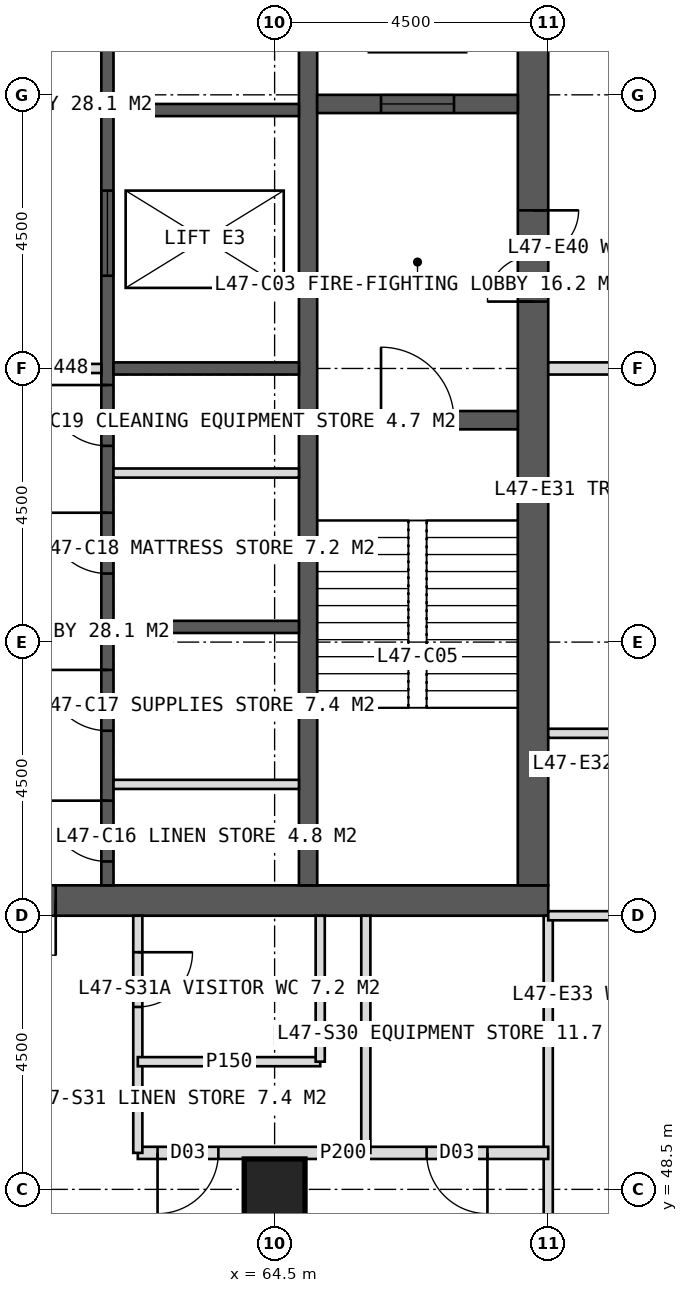
"""IFC4 building model, lengths in metres.
Left out: names, types, materials, properties, quantities, classifications, styles, units other than length and angle.
Written with IfcOpenShell. Run it as: python <this file> out.ifc"""

import sys

from ifc_helpers import new_model, si_unit, direction, frame, frame_2d, origin, origin_2d, place, context, subcontext, project, spatial, rectangle, hollow_rectangle, extrude, element, fill, save


model = new_model("IFC4")
c1 = context("Model", 3, precision=1e-05, world=origin(), true_north=direction((0.0, 1.0)))
c2 = subcontext(c1, "Body", "Model", "MODEL_VIEW")
j1 = project(units=[si_unit("LENGTHUNIT", "METRE"), si_unit("PLANEANGLEUNIT", "RADIAN")], contexts=[c1])
p1 = place(None, origin())
s1 = spatial("IfcSite", under=j1, at=p1, CompositionType="ELEMENT")
p2 = place(p1, origin())
s2 = spatial("IfcBuilding", under=s1, at=p2, CompositionType="ELEMENT")
p3 = place(p2, frame((0.0, 0.0, 197.0)))
s3 = spatial("IfcBuildingStorey", under=s2, at=p3, CompositionType="ELEMENT", Elevation=197.0)
p4 = place(p3, frame((51.0, 53.25, 0.0), z_axis=(0.0, 0.0, 1.0), x_axis=(1.0, 0.0, 0.0)))
e1 = element("IfcWall", 1, at=p4, inside=s3, PredefinedType="SHEAR", context=c2, shape_type="SweptSolid", body=[
    extrude(rectangle(XDim=18.0, YDim=0.5, at=frame_2d((9.0, 0.0))), origin(), (0.0, 0.0, 1.0), 4.0),
])
p5 = place(p4, frame((8.1, 0.0, 0.0)))
e2 = element("IfcOpeningElement", 2, at=p5, cuts=e1, PredefinedType="OPENING", context=c2, shape_type="SweptSolid", body=[
    extrude(rectangle(XDim=1.8, YDim=2.2, at=frame_2d((0.9, 1.1))), frame((0.0, 0.26, 0.0), z_axis=(0.0, -1.0, 0.0), x_axis=(1.0, 0.0, 0.0)), (0.0, 0.0, 1.0), 0.52),
])
p6 = place(p3, frame((68.75, 53.5, 0.0), z_axis=(0.0, 0.0, 1.0), x_axis=(0.0, 1.0, 0.0)))
e3 = element("IfcWall", 3, at=p6, inside=s3, PredefinedType="SHEAR", context=c2, shape_type="SweptSolid", body=[
    extrude(rectangle(XDim=17.0, YDim=0.5, at=frame_2d((8.5, 0.0))), origin(), (0.0, 0.0, 1.0), 4.0),
])
p7 = place(p6, frame((9.6, 0.0, 0.0)))
e4 = element("IfcOpeningElement", 4, at=p7, cuts=e3, PredefinedType="OPENING", context=c2, shape_type="SweptSolid", body=[
    extrude(rectangle(XDim=1.5, YDim=2.2, at=frame_2d((0.75, 1.1))), frame((0.0, 0.26, 0.0), z_axis=(0.0, -1.0, 0.0), x_axis=(1.0, 0.0, 0.0)), (0.0, 0.0, 1.0), 0.52),
])
p8 = place(p3, frame((65.05, 53.5, 0.0), z_axis=(0.0, 0.0, 1.0), x_axis=(0.0, 1.0, 0.0)))
e5 = element("IfcWall", 5, at=p8, inside=s3, PredefinedType="SHEAR", context=c2, shape_type="SweptSolid", body=[
    extrude(rectangle(XDim=17.0, YDim=0.3, at=frame_2d((8.5, 0.0))), origin(), (0.0, 0.0, 1.0), 4.0),
])
p9 = place(p3, frame((61.75, 53.5, 0.0), z_axis=(0.0, 0.0, 1.0), x_axis=(0.0, 1.0, 0.0)))
e6 = element("IfcWall", 6, at=p9, inside=s3, PredefinedType="SHEAR", context=c2, shape_type="SweptSolid", body=[
    extrude(rectangle(XDim=17.0, YDim=0.2, at=frame_2d((8.5, 0.0))), origin(), (0.0, 0.0, 1.0), 4.0),
])
p10 = place(p9, frame((0.393, 0.0, 0.0)))
e7 = element("IfcOpeningElement", 7, at=p10, cuts=e6, PredefinedType="OPENING", context=c2, shape_type="SweptSolid", body=[
    extrude(rectangle(XDim=1.0, YDim=2.1, at=frame_2d((0.5, 1.05))), frame((0.0, 0.11, 0.0), z_axis=(0.0, -1.0, 0.0), x_axis=(1.0, 0.0, 0.0)), (0.0, 0.0, 1.0), 0.22),
])
p11 = place(p9, frame((2.542, 0.0, 0.0)))
e8 = element("IfcOpeningElement", 8, at=p11, cuts=e6, PredefinedType="OPENING", context=c2, shape_type="SweptSolid", body=[
    extrude(rectangle(XDim=1.0, YDim=2.1, at=frame_2d((0.5, 1.05))), frame((0.0, 0.11, 0.0), z_axis=(0.0, -1.0, 0.0), x_axis=(1.0, 0.0, 0.0)), (0.0, 0.0, 1.0), 0.22),
])
p12 = place(p9, frame((5.127, 0.0, 0.0)))
e9 = element("IfcOpeningElement", 9, at=p12, cuts=e6, PredefinedType="OPENING", context=c2, shape_type="SweptSolid", body=[
    extrude(rectangle(XDim=1.0, YDim=2.1, at=frame_2d((0.5, 1.05))), frame((0.0, 0.11, 0.0), z_axis=(0.0, -1.0, 0.0), x_axis=(1.0, 0.0, 0.0)), (0.0, 0.0, 1.0), 0.22),
])
p13 = place(p9, frame((7.228, 0.0, 0.0)))
e10 = element("IfcOpeningElement", 10, at=p13, cuts=e6, PredefinedType="OPENING", context=c2, shape_type="SweptSolid", body=[
    extrude(rectangle(XDim=1.0, YDim=2.1, at=frame_2d((0.5, 1.05))), frame((0.0, 0.11, 0.0), z_axis=(0.0, -1.0, 0.0), x_axis=(1.0, 0.0, 0.0)), (0.0, 0.0, 1.0), 0.22),
])
p14 = place(p9, frame((10.025, 0.0, 0.0)))
e11 = element("IfcOpeningElement", 11, at=p14, cuts=e6, PredefinedType="OPENING", context=c2, shape_type="SweptSolid", body=[
    extrude(rectangle(XDim=1.4, YDim=2.2, at=frame_2d((0.7, 1.1))), frame((0.0, 0.11, 0.0), z_axis=(0.0, -1.0, 0.0), x_axis=(1.0, 0.0, 0.0)), (0.0, 0.0, 1.0), 0.22),
])
p15 = place(p9, frame((14.325, 0.0, 0.0)))
e12 = element("IfcOpeningElement", 12, at=p15, cuts=e6, PredefinedType="OPENING", context=c2, shape_type="SweptSolid", body=[
    extrude(rectangle(XDim=1.4, YDim=2.2, at=frame_2d((0.7, 1.1))), frame((0.0, 0.11, 0.0), z_axis=(0.0, -1.0, 0.0), x_axis=(1.0, 0.0, 0.0)), (0.0, 0.0, 1.0), 0.22),
])
for number, where, z_axis, x_axis in (
    (13, (61.85, 57.75, 0.0), (0.0, 0.0, 1.0), (1.0, 0.0, 0.0)),
    (14, (61.85, 62.0, 0.0), (0.0, 0.0, 1.0), (1.0, 0.0, 0.0)),
    (15, (61.85, 66.25, 0.0), (0.0, 0.0, 1.0), (1.0, 0.0, 0.0)),
):
    element("IfcWall", number, at=place(p3, frame(where, z_axis=z_axis, x_axis=x_axis)), inside=s3, PredefinedType="SHEAR", context=c2, shape_type="SweptSolid", body=[
        extrude(rectangle(XDim=3.05, YDim=0.2, at=frame_2d((1.525, 0.0))), origin(), (0.0, 0.0, 1.0), 4.0),
    ])
p16 = place(p3, frame((65.2, 61.15, 0.0), z_axis=(0.0, 0.0, 1.0), x_axis=(1.0, 0.0, 0.0)))
e16 = element("IfcWall", 16, at=p16, inside=s3, PredefinedType="SHEAR", context=c2, shape_type="SweptSolid", body=[
    extrude(rectangle(XDim=3.3, YDim=0.3, at=frame_2d((1.65, 0.0))), origin(), (0.0, 0.0, 1.0), 4.0),
])
p17 = place(p16, frame((1.05, 0.0, 0.0)))
e17 = element("IfcOpeningElement", 17, at=p17, cuts=e16, PredefinedType="OPENING", context=c2, shape_type="SweptSolid", body=[
    extrude(rectangle(XDim=1.2, YDim=2.1, at=frame_2d((0.6, 1.05))), frame((0.0, 0.16, 0.0), z_axis=(0.0, -1.0, 0.0), x_axis=(1.0, 0.0, 0.0)), (0.0, 0.0, 1.0), 0.32),
])
p18 = place(p3, frame((65.2, 66.35, 0.0), z_axis=(0.0, 0.0, 1.0), x_axis=(1.0, 0.0, 0.0)))
e18 = element("IfcWall", 18, at=p18, inside=s3, PredefinedType="SHEAR", context=c2, shape_type="SweptSolid", body=[
    extrude(rectangle(XDim=3.3, YDim=0.3, at=frame_2d((1.65, 0.0))), origin(), (0.0, 0.0, 1.0), 4.0),
])
p19 = place(p18, frame((1.05, 0.0, 0.0)))
e19 = element("IfcOpeningElement", 19, at=p19, cuts=e18, PredefinedType="OPENING", context=c2, shape_type="SweptSolid", body=[
    extrude(rectangle(XDim=1.2, YDim=2.2, at=frame_2d((0.6, 1.1))), frame((0.0, 0.16, 0.0), z_axis=(0.0, -1.0, 0.0), x_axis=(1.0, 0.0, 0.0)), (0.0, 0.0, 1.0), 0.32),
])
p20 = place(p3, frame((64.5, 48.5, 0.0), z_axis=(0.0, 0.0, 1.0), x_axis=(1.0, 0.0, 0.0)))
e20 = element("IfcColumn", 20, at=p20, inside=s3, PredefinedType="COLUMN", context=c2, shape_type="SweptSolid", body=[
    extrude(hollow_rectangle(XDim=1.0, YDim=1.0, WallThickness=0.1, at=origin_2d()), origin(), (0.0, 0.0, 1.0), 4.0),
])
p21 = place(p3, frame((69.0, 53.0, 0.0), z_axis=(0.0, 0.0, 1.0), x_axis=(0.0, -1.0, 0.0)))
e21 = element("IfcWall", 21, at=p21, inside=s3, PredefinedType="PARTITIONING", context=c2, shape_type="SweptSolid", body=[
    extrude(rectangle(XDim=5.4, YDim=0.15, at=frame_2d((2.7, 0.0))), origin(), (0.0, 0.0, 1.0), 3.75),
])
p22 = place(p3, frame((69.0, 49.1, 0.0), z_axis=(0.0, 0.0, 1.0), x_axis=(-1.0, 0.0, 0.0)))
e22 = element("IfcWall", 22, at=p22, inside=s3, PredefinedType="PARTITIONING", context=c2, shape_type="SweptSolid", body=[
    extrude(rectangle(XDim=6.75, YDim=0.2, at=frame_2d((3.375, 0.0))), origin(), (0.0, 0.0, 1.0), 3.75),
])
p23 = place(p22, frame((1.0, 0.0, 0.0)))
e23 = element("IfcOpeningElement", 23, at=p23, cuts=e22, PredefinedType="OPENING", context=c2, shape_type="SweptSolid", body=[
    extrude(rectangle(XDim=1.0, YDim=2.1, at=frame_2d((0.5, 1.05))), frame((0.0, 0.11, 0.0), z_axis=(0.0, -1.0, 0.0), x_axis=(1.0, 0.0, 0.0)), (0.0, 0.0, 1.0), 0.22),
])
p24 = place(p22, frame((5.425, 0.0, 0.0)))
e24 = element("IfcOpeningElement", 24, at=p24, cuts=e22, PredefinedType="OPENING", context=c2, shape_type="SweptSolid", body=[
    extrude(rectangle(XDim=1.0, YDim=2.1, at=frame_2d((0.5, 1.05))), frame((0.0, 0.11, 0.0), z_axis=(0.0, -1.0, 0.0), x_axis=(1.0, 0.0, 0.0)), (0.0, 0.0, 1.0), 0.22),
])
p25 = place(p3, frame((62.25, 53.0, 0.0), z_axis=(0.0, 0.0, 1.0), x_axis=(0.0, -1.0, 0.0)))
e25 = element("IfcWall", 25, at=p25, inside=s3, PredefinedType="PARTITIONING", context=c2, shape_type="SweptSolid", body=[
    extrude(rectangle(XDim=3.9, YDim=0.15, at=frame_2d((1.95, 0.0))), origin(), (0.0, 0.0, 1.0), 3.75),
])
p26 = place(p25, frame((0.6, 0.0, 0.0)))
e26 = element("IfcOpeningElement", 26, at=p26, cuts=e25, PredefinedType="OPENING", context=c2, shape_type="SweptSolid", body=[
    extrude(rectangle(XDim=0.9, YDim=2.1, at=frame_2d((0.45, 1.05))), frame((0.0, 0.085, 0.0), z_axis=(0.0, -1.0, 0.0), x_axis=(1.0, 0.0, 0.0)), (0.0, 0.0, 1.0), 0.17),
])
p27 = place(p3, frame((66.0, 53.0, 0.0), z_axis=(0.0, 0.0, 1.0), x_axis=(0.0, -1.0, 0.0)))
e27 = element("IfcWall", 27, at=p27, inside=s3, PredefinedType="PARTITIONING", context=c2, shape_type="SweptSolid", body=[
    extrude(rectangle(XDim=3.9, YDim=0.15, at=frame_2d((1.95, 0.0))), origin(), (0.0, 0.0, 1.0), 3.75),
])
p28 = place(p3, frame((65.25, 50.6, 0.0), z_axis=(0.0, 0.0, 1.0), x_axis=(-1.0, 0.0, 0.0)))
e28 = element("IfcWall", 28, at=p28, inside=s3, PredefinedType="PARTITIONING", context=c2, shape_type="SweptSolid", body=[
    extrude(rectangle(XDim=3.0, YDim=0.15, at=frame_2d((1.5, 0.0))), origin(), (0.0, 0.0, 1.0), 3.75),
])
p29 = place(p3, frame((65.25, 53.0, 0.0), z_axis=(0.0, 0.0, 1.0), x_axis=(0.0, -1.0, 0.0)))
e29 = element("IfcWall", 29, at=p29, inside=s3, PredefinedType="PARTITIONING", context=c2, shape_type="SweptSolid", body=[
    extrude(rectangle(XDim=2.4, YDim=0.15, at=frame_2d((1.2, 0.0))), origin(), (0.0, 0.0, 1.0), 3.75),
])
p30 = place(p3, frame((69.0, 62.0, 0.0), z_axis=(0.0, 0.0, 1.0), x_axis=(1.0, 0.0, 0.0)))
e30 = element("IfcWall", 30, at=p30, inside=s3, PredefinedType="SOLIDWALL", context=c2, shape_type="SweptSolid", body=[
    extrude(rectangle(XDim=5.4, YDim=0.2, at=frame_2d((2.7, 0.0))), origin(), (0.0, 0.0, 1.0), 2.95),
])
for number, where, z_axis, x_axis in (
    (31, (69.0, 56.0, 0.0), (0.0, 0.0, 1.0), (1.0, 0.0, 0.0)),
    (32, (69.0, 53.0, 0.0), (0.0, 0.0, 1.0), (1.0, 0.0, 0.0)),
):
    element("IfcWall", number, at=place(p3, frame(where, z_axis=z_axis, x_axis=x_axis)), inside=s3, PredefinedType="PARTITIONING", context=c2, shape_type="SweptSolid", body=[
        extrude(rectangle(XDim=5.4, YDim=0.15, at=frame_2d((2.7, 0.0))), origin(), (0.0, 0.0, 1.0), 3.75),
    ])
for number, where, z_axis, x_axis in (
    (33, (61.85, 55.16, 0.0), (0.0, 0.0, 1.0), (1.0, 0.0, 0.0)),
    (34, (61.85, 60.28, 0.0), (0.0, 0.0, 1.0), (1.0, 0.0, 0.0)),
):
    element("IfcWall", number, at=place(p3, frame(where, z_axis=z_axis, x_axis=x_axis)), inside=s3, PredefinedType="PARTITIONING", context=c2, shape_type="SweptSolid", body=[
        extrude(rectangle(XDim=3.05, YDim=0.15, at=frame_2d((1.525, 0.0))), origin(), (0.0, 0.0, 1.0), 3.75),
    ])
p31 = place(p3, frame((58.35, 62.0, 0.0), z_axis=(0.0, 0.0, 1.0), x_axis=(1.0, 0.0, 0.0)))
e35 = element("IfcWall", 35, at=p31, inside=s3, PredefinedType="PARTITIONING", context=c2, shape_type="SweptSolid", body=[
    extrude(rectangle(XDim=3.3, YDim=0.15, at=frame_2d((1.65, 0.0))), origin(), (0.0, 0.0, 1.0), 3.75),
])
p32 = place(p23, origin())
e36 = element("IfcDoor", 36, at=p32, inside=s3, OperationType="SINGLE_SWING_LEFT", PredefinedType="DOOR", context=c2, shape_type="SweptSolid", body=[
    extrude(rectangle(XDim=1.0, YDim=2.1, at=frame_2d((0.5, 1.05))), frame((0.0, 0.025, 0.0), z_axis=(0.0, -1.0, 0.0), x_axis=(1.0, 0.0, 0.0)), (0.0, 0.0, 1.0), 0.05),
])
fill(e23, e36)
p33 = place(p26, origin())
e37 = element("IfcDoor", 37, at=p33, inside=s3, OperationType="SINGLE_SWING_LEFT", PredefinedType="DOOR", context=c2, shape_type="SweptSolid", body=[
    extrude(rectangle(XDim=0.9, YDim=2.1, at=frame_2d((0.45, 1.05))), frame((0.0, 0.025, 0.0), z_axis=(0.0, -1.0, 0.0), x_axis=(1.0, 0.0, 0.0)), (0.0, 0.0, 1.0), 0.05),
])
fill(e26, e37)
p34 = place(p24, origin())
e38 = element("IfcDoor", 38, at=p34, inside=s3, OperationType="SINGLE_SWING_RIGHT", PredefinedType="DOOR", context=c2, shape_type="SweptSolid", body=[
    extrude(rectangle(XDim=1.0, YDim=2.1, at=frame_2d((0.5, 1.05))), frame((0.0, 0.025, 0.0), z_axis=(0.0, -1.0, 0.0), x_axis=(1.0, 0.0, 0.0)), (0.0, 0.0, 1.0), 0.05),
])
fill(e24, e38)
p35 = place(p7, origin())
e39 = element("IfcDoor", 39, at=p35, inside=s3, OperationType="DOUBLE_DOOR_SINGLE_SWING", PredefinedType="DOOR", context=c2, shape_type="SweptSolid", body=[
    extrude(rectangle(XDim=1.5, YDim=2.2, at=frame_2d((0.75, 1.1))), frame((0.0, 0.025, 0.0), z_axis=(0.0, -1.0, 0.0), x_axis=(1.0, 0.0, 0.0)), (0.0, 0.0, 1.0), 0.05),
])
fill(e4, e39)
p36 = place(p17, origin())
e40 = element("IfcDoor", 40, at=p36, inside=s3, OperationType="SINGLE_SWING_LEFT", PredefinedType="DOOR", context=c2, shape_type="SweptSolid", body=[
    extrude(rectangle(XDim=1.2, YDim=2.1, at=frame_2d((0.6, 1.05))), frame((0.0, 0.025, 0.0), z_axis=(0.0, -1.0, 0.0), x_axis=(1.0, 0.0, 0.0)), (0.0, 0.0, 1.0), 0.05),
])
fill(e17, e40)
p37 = place(p19, origin())
e41 = element("IfcDoor", 41, at=p37, inside=s3, OperationType="SLIDING_TO_LEFT", PredefinedType="DOOR", context=c2, shape_type="SweptSolid", body=[
    extrude(rectangle(XDim=1.2, YDim=2.2, at=frame_2d((0.6, 1.1))), frame((0.0, 0.025, 0.0), z_axis=(0.0, -1.0, 0.0), x_axis=(1.0, 0.0, 0.0)), (0.0, 0.0, 1.0), 0.05),
])
fill(e19, e41)
p38 = place(p10, origin())
e42 = element("IfcDoor", 42, at=p38, inside=s3, OperationType="SINGLE_SWING_RIGHT", PredefinedType="DOOR", context=c2, shape_type="SweptSolid", body=[
    extrude(rectangle(XDim=1.0, YDim=2.1, at=frame_2d((0.5, 1.05))), frame((0.0, 0.025, 0.0), z_axis=(0.0, -1.0, 0.0), x_axis=(1.0, 0.0, 0.0)), (0.0, 0.0, 1.0), 0.05),
])
fill(e7, e42)
p39 = place(p11, origin())
e43 = element("IfcDoor", 43, at=p39, inside=s3, OperationType="SINGLE_SWING_RIGHT", PredefinedType="DOOR", context=c2, shape_type="SweptSolid", body=[
    extrude(rectangle(XDim=1.0, YDim=2.1, at=frame_2d((0.5, 1.05))), frame((0.0, 0.025, 0.0), z_axis=(0.0, -1.0, 0.0), x_axis=(1.0, 0.0, 0.0)), (0.0, 0.0, 1.0), 0.05),
])
fill(e8, e43)
p40 = place(p12, origin())
e44 = element("IfcDoor", 44, at=p40, inside=s3, OperationType="SINGLE_SWING_RIGHT", PredefinedType="DOOR", context=c2, shape_type="SweptSolid", body=[
    extrude(rectangle(XDim=1.0, YDim=2.1, at=frame_2d((0.5, 1.05))), frame((0.0, 0.025, 0.0), z_axis=(0.0, -1.0, 0.0), x_axis=(1.0, 0.0, 0.0)), (0.0, 0.0, 1.0), 0.05),
])
fill(e9, e44)
p41 = place(p13, origin())
e45 = element("IfcDoor", 45, at=p41, inside=s3, OperationType="SINGLE_SWING_RIGHT", PredefinedType="DOOR", context=c2, shape_type="SweptSolid", body=[
    extrude(rectangle(XDim=1.0, YDim=2.1, at=frame_2d((0.5, 1.05))), frame((0.0, 0.025, 0.0), z_axis=(0.0, -1.0, 0.0), x_axis=(1.0, 0.0, 0.0)), (0.0, 0.0, 1.0), 0.05),
])
fill(e10, e45)
p42 = place(p14, origin())
e46 = element("IfcDoor", 46, at=p42, inside=s3, OperationType="SLIDING_TO_LEFT", PredefinedType="DOOR", context=c2, shape_type="SweptSolid", body=[
    extrude(rectangle(XDim=1.4, YDim=2.2, at=frame_2d((0.7, 1.1))), frame((0.0, 0.025, 0.0), z_axis=(0.0, -1.0, 0.0), x_axis=(1.0, 0.0, 0.0)), (0.0, 0.0, 1.0), 0.05),
])
fill(e11, e46)
p43 = place(p5, origin())
e47 = element("IfcDoor", 47, at=p43, inside=s3, OperationType="DOUBLE_DOOR_SINGLE_SWING", PredefinedType="DOOR", context=c2, shape_type="SweptSolid", body=[
    extrude(rectangle(XDim=1.8, YDim=2.2, at=frame_2d((0.9, 1.1))), frame((0.0, 0.025, 0.0), z_axis=(0.0, -1.0, 0.0), x_axis=(1.0, 0.0, 0.0)), (0.0, 0.0, 1.0), 0.05),
])
fill(e2, e47)
save(model, sys.argv[1])
